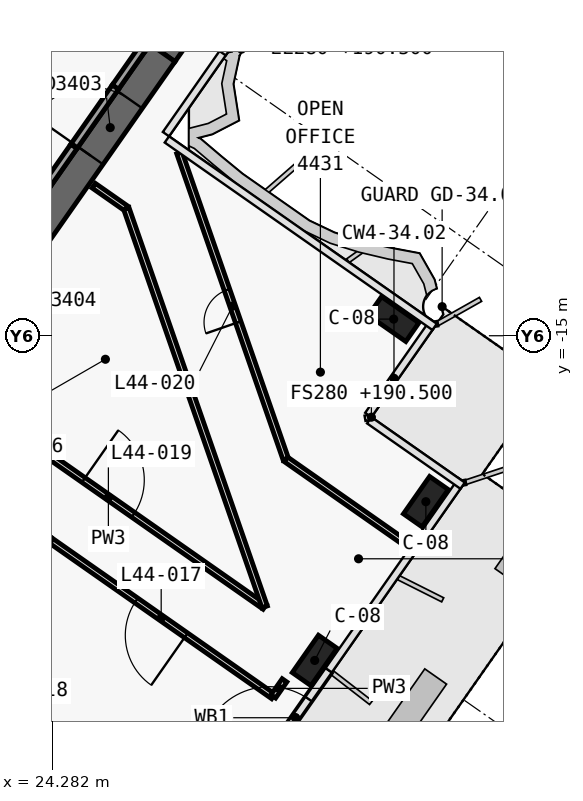
"""IFC4 building model, lengths in metres.
Left out: names, types, materials, properties, quantities, classifications, styles, units other than length and angle.
Written with IfcOpenShell. Run it as: python <this file> out.ifc"""

import sys

from ifc_helpers import new_model, si_unit, direction, frame, frame_2d, origin, origin_2d, place, context, subcontext, project, spatial, polyline, rectangle, outline, extrude, element, fill, save


model = new_model("IFC4")
c1 = context("Model", 3, precision=1e-05, world=origin(), true_north=direction((0.0, 1.0)))
c2 = subcontext(c1, "Body", "Model", "MODEL_VIEW")
j1 = project(units=[si_unit("LENGTHUNIT", "METRE"), si_unit("PLANEANGLEUNIT", "RADIAN")], contexts=[c1])
p1 = place(None, origin())
s1 = spatial("IfcSite", under=j1, at=p1, CompositionType="ELEMENT")
p2 = place(p1, origin())
s2 = spatial("IfcBuilding", under=s1, at=p2, CompositionType="ELEMENT")
p3 = place(p2, frame((0.0, 0.0, 190.5)))
s3 = spatial("IfcBuildingStorey", under=s2, at=p3, CompositionType="ELEMENT", Elevation=190.5)
p4 = place(p3, frame((-0.029, 11.984, 0.0), z_axis=(0.0, 0.0, 1.0), x_axis=(0.819151382952, -0.573577380837, 0.0)))
e1 = element("IfcWall", 1, at=p4, inside=s3, PredefinedType="SHEAR", context=c2, shape_type="SweptSolid", body=[
    extrude(outline(polyline([(33.898, 0.4), (-0.0, 0.4), (0.56, -0.4), (33.898, -0.4), (33.898, 0.4)])), origin(), (0.0, 0.0, 1.0), 3.9),
])
p5 = place(p3, frame((21.675, -15.421, 0.0), z_axis=(0.0, 0.0, 1.0), x_axis=(0.573581815061, 0.819148278049, 0.0)))
e2 = element("IfcWall", 2, at=p5, inside=s3, PredefinedType="SHEAR", context=c2, shape_type="SweptSolid", body=[
    extrude(outline(polyline([(9.6, 0.4), (0.0, 0.4), (0.0, -0.4), (9.6, -0.4), (9.6, 0.4)])), origin(), (0.0, 0.0, 1.0), 3.9),
])
p6 = place(p5, frame((6.3, 0.0, 0.0)))
e3 = element("IfcOpeningElement", 3, at=p6, cuts=e2, PredefinedType="OPENING", context=c2, shape_type="SweptSolid", body=[
    extrude(rectangle(XDim=1.8, YDim=2.1, at=frame_2d((0.9, 1.05))), frame((0.0, 0.41, 0.0), z_axis=(0.0, -1.0, 0.0), x_axis=(1.0, 0.0, 0.0)), (0.0, 0.0, 1.0), 0.82),
])
p7 = place(p5, frame((2.1, 0.0, 0.0)))
e4 = element("IfcOpeningElement", 4, at=p7, cuts=e2, PredefinedType="OPENING", context=c2, shape_type="SweptSolid", body=[
    extrude(rectangle(XDim=1.8, YDim=2.1, at=frame_2d((0.9, 1.05))), frame((0.0, 0.41, 0.0), z_axis=(0.0, -1.0, 0.0), x_axis=(1.0, 0.0, 0.0)), (0.0, 0.0, 1.0), 0.82),
])
for number, where, z_axis, x_axis in (
    (5, (33.263, -14.562, 0.0), (0.0, 0.0, 1.0), (0.819, -0.574, 0.0)),
    (6, (31.185, -23.545, 0.0), (0.0, 0.0, 1.0), (0.574, 0.819, 0.0)),
    (7, (34.11, -19.367, 0.0), (0.0, 0.0, 1.0), (0.574, 0.819, 0.0)),
):
    element("IfcColumn", number, at=place(p3, frame(where, z_axis=z_axis, x_axis=x_axis)), inside=s3, PredefinedType="COLUMN", context=c2, shape_type="SweptSolid", body=[
        extrude(rectangle(XDim=1.2, YDim=0.6, at=origin_2d()), origin(), (0.0, 0.0, 1.0), 3.9),
    ])
p8 = place(p3, frame((24.162, -10.998, 0.0), z_axis=(0.0, 0.0, 1.0), x_axis=(0.573612502218, 0.819126789514, 0.0)))
e8 = element("IfcWall", 8, at=p8, inside=s3, PredefinedType="SOLIDWALL", context=c2, shape_type="SweptSolid", body=[
    extrude(rectangle(XDim=1.2, YDim=0.2, at=frame_2d((0.6, 0.0))), origin(), (0.0, 0.0, 1.0), 3.62),
])
p9 = place(p3, frame((25.94, -8.458, 0.0), z_axis=(0.0, 0.0, 1.0), x_axis=(0.573619628835, 0.819121798889, 0.0)))
e9 = element("IfcWall", 9, at=p9, inside=s3, PredefinedType="SOLIDWALL", context=c2, shape_type="SweptSolid", body=[
    extrude(rectangle(XDim=1.25, YDim=0.2, at=frame_2d((0.625, 0.0))), origin(), (0.0, 0.0, 1.0), 3.62),
])
p10 = place(p3, frame((24.85, -10.014, 2.15), z_axis=(0.0, 0.0, 1.0), x_axis=(0.573505465124, 0.819201734296, 0.0)))
e10 = element("IfcWall", 10, at=p10, inside=s3, PredefinedType="SOLIDWALL", context=c2, shape_type="SweptSolid", body=[
    extrude(rectangle(XDim=1.9, YDim=0.2, at=frame_2d((0.95, 0.0))), origin(), (0.0, 0.0, 1.0), 1.47),
])
p11 = place(p3, frame((29.821, -26.277, 0.0), z_axis=(0.0, 0.0, 1.0), x_axis=(0.57360481557, 0.819132172213, 0.0)))
e11 = element("IfcWall", 11, at=p11, inside=s3, PredefinedType="SOLIDWALL", context=c2, shape_type="SweptSolid", body=[
    extrude(rectangle(XDim=2.99, YDim=0.2, at=frame_2d((1.495, 0.0))), origin(), (0.0, 0.0, 1.0), 3.62),
])
p12 = place(p11, frame((0.295, 0.0, 0.0)))
e12 = element("IfcOpeningElement", 12, at=p12, cuts=e11, PredefinedType="OPENING", context=c2, shape_type="SweptSolid", body=[
    extrude(rectangle(XDim=1.8, YDim=2.4, at=frame_2d((0.9, 1.2))), frame((0.0, 0.11, 0.0), z_axis=(0.0, -1.0, 0.0), x_axis=(1.0, 0.0, 0.0)), (0.0, 0.0, 1.0), 0.22),
])
p13 = place(p3, frame((21.642, -16.375, 0.0), z_axis=(0.0, 0.0, 1.0), x_axis=(0.819157697527, -0.573568362606, 0.0)))
e13 = element("IfcWall", 13, at=p13, inside=s3, PredefinedType="PARTITIONING", context=c2, shape_type="SweptSolid", body=[
    extrude(rectangle(XDim=10.045, YDim=0.15, at=frame_2d((5.023, 0.0))), origin(), (0.0, 0.0, 1.0), 3.0),
])
p14 = place(p13, frame((4.223, 0.0, 0.0)))
e14 = element("IfcOpeningElement", 14, at=p14, cuts=e13, PredefinedType="OPENING", context=c2, shape_type="SweptSolid", body=[
    extrude(rectangle(XDim=1.6, YDim=2.1, at=frame_2d((0.8, 1.05))), frame((0.0, 0.085, 0.0), z_axis=(0.0, -1.0, 0.0), x_axis=(1.0, 0.0, 0.0)), (0.0, 0.0, 1.0), 0.17),
])
p15 = place(p3, frame((30.095, -24.491, 0.0), z_axis=(0.0, 0.0, 1.0), x_axis=(-0.819144322262, 0.57358746439, 0.0)))
e15 = element("IfcWall", 15, at=p15, inside=s3, PredefinedType="PARTITIONING", context=c2, shape_type="SweptSolid", body=[
    extrude(rectangle(XDim=7.202, YDim=0.15, at=frame_2d((3.601, 0.0))), origin(), (0.0, 0.0, 1.0), 3.0),
])
p16 = place(p15, frame((2.801, 0.0, 0.0)))
e16 = element("IfcOpeningElement", 16, at=p16, cuts=e15, PredefinedType="OPENING", context=c2, shape_type="SweptSolid", body=[
    extrude(rectangle(XDim=1.6, YDim=2.1, at=frame_2d((0.8, 1.05))), frame((0.0, 0.085, 0.0), z_axis=(0.0, -1.0, 0.0), x_axis=(1.0, 0.0, 0.0)), (0.0, 0.0, 1.0), 0.17),
])
p17 = place(p3, frame((30.391, -24.069, 0.0), z_axis=(0.0, 0.0, 1.0), x_axis=(-0.573462344363, -0.819231920519, 0.0)))
e17 = element("IfcWall", 17, at=p17, inside=s3, PredefinedType="PARTITIONING", context=c2, shape_type="SweptSolid", body=[
    extrude(rectangle(XDim=0.516, YDim=0.15, at=frame_2d((0.258, 0.0))), origin(), (0.0, 0.0, 1.0), 3.62),
])
p18 = place(p3, frame((30.425, -18.251, 0.0), z_axis=(0.0, 0.0, 1.0), x_axis=(-0.328044658963, 0.944662215676, 0.0)))
e18 = element("IfcWall", 18, at=p18, inside=s3, PredefinedType="PARTITIONING", context=c2, shape_type="SweptSolid", body=[
    extrude(rectangle(XDim=8.536, YDim=0.15, at=frame_2d((4.268, 0.0))), origin(), (0.0, 0.0, 1.0), 3.0),
])
p19 = place(p18, frame((3.818, 0.0, 0.0)))
e19 = element("IfcOpeningElement", 19, at=p19, cuts=e18, PredefinedType="OPENING", context=c2, shape_type="SweptSolid", body=[
    extrude(rectangle(XDim=0.9, YDim=2.1, at=frame_2d((0.45, 1.05))), frame((0.0, 0.085, 0.0), z_axis=(0.0, -1.0, 0.0), x_axis=(1.0, 0.0, 0.0)), (0.0, 0.0, 1.0), 0.17),
])
p20 = place(p3, frame((33.709, -20.55, 0.0), z_axis=(0.0, 0.0, 1.0), x_axis=(-0.819146074823, 0.573584961538, 0.0)))
e20 = element("IfcWall", 20, at=p20, inside=s3, PredefinedType="PARTITIONING", context=c2, shape_type="SweptSolid", body=[
    extrude(rectangle(XDim=4.009, YDim=0.15, at=frame_2d((2.004, 0.0))), origin(), (0.0, 0.0, 1.0), 2.9),
])
p21 = place(p3, frame((25.37, -11.051, 0.0), z_axis=(0.0, 0.0, 1.0), x_axis=(0.819396161963, -0.573227642181, 0.0)))
e21 = element("IfcWall", 21, at=p21, inside=s3, PredefinedType="PARTITIONING", context=c2, shape_type="SweptSolid", body=[
    extrude(rectangle(XDim=1.047, YDim=0.15, at=frame_2d((0.524, 0.0))), origin(), (0.0, 0.0, 1.0), 3.62),
])
p22 = place(p3, frame((26.228, -11.651, 0.0), z_axis=(0.0, 0.0, 1.0), x_axis=(0.328068399041, -0.944653971331, 0.0)))
e22 = element("IfcWall", 22, at=p22, inside=s3, PredefinedType="PARTITIONING", context=c2, shape_type="SweptSolid", body=[
    extrude(rectangle(XDim=11.099, YDim=0.15, at=frame_2d((5.549, 0.0))), origin(), (0.0, 0.0, 1.0), 3.0),
])
p23 = place(p3, frame((25.629, -26.859, 0.0), z_axis=(0.0, 0.0, 1.0), x_axis=(-0.819154669329, 0.573572687386, 0.0)))
e23 = element("IfcWall", 23, at=p23, inside=s3, PredefinedType="PARTITIONING", context=c2, shape_type="SweptSolid", body=[
    extrude(rectangle(XDim=4.9, YDim=0.1, at=frame_2d((2.45, 0.0))), origin(), (0.0, 0.0, 1.0), 3.0),
])
p24 = place(p23, frame((2.0, 0.0, 0.0)))
e24 = element("IfcOpeningElement", 24, at=p24, cuts=e23, PredefinedType="OPENING", context=c2, shape_type="SweptSolid", body=[
    extrude(rectangle(XDim=0.9, YDim=2.1, at=frame_2d((0.45, 1.05))), frame((0.0, 0.06, 0.0), z_axis=(0.0, -1.0, 0.0), x_axis=(1.0, 0.0, 0.0)), (0.0, 0.0, 1.0), 0.12),
])
p25 = place(p6, origin())
e25 = element("IfcDoor", 25, at=p25, inside=s3, OperationType="DOUBLE_DOOR_SINGLE_SWING", PredefinedType="DOOR", context=c2, shape_type="SweptSolid", body=[
    extrude(rectangle(XDim=1.8, YDim=2.1, at=frame_2d((0.9, 1.05))), frame((0.0, 0.025, 0.0), z_axis=(0.0, -1.0, 0.0), x_axis=(1.0, 0.0, 0.0)), (0.0, 0.0, 1.0), 0.05),
])
fill(e3, e25)
p26 = place(p12, origin())
e26 = element("IfcDoor", 26, at=p26, inside=s3, OperationType="DOUBLE_DOOR_DOUBLE_SWING", PredefinedType="DOOR", context=c2, shape_type="SweptSolid", body=[
    extrude(rectangle(XDim=1.8, YDim=2.4, at=frame_2d((0.9, 1.2))), frame((0.0, 0.025, 0.0), z_axis=(0.0, -1.0, 0.0), x_axis=(1.0, 0.0, 0.0)), (0.0, 0.0, 1.0), 0.05),
])
fill(e12, e26)
p27 = place(p16, origin())
e27 = element("IfcDoor", 27, at=p27, inside=s3, OperationType="DOUBLE_DOOR_SINGLE_SWING", PredefinedType="DOOR", context=c2, shape_type="SweptSolid", body=[
    extrude(rectangle(XDim=1.6, YDim=2.1, at=frame_2d((0.8, 1.05))), frame((0.0, 0.025, 0.0), z_axis=(0.0, -1.0, 0.0), x_axis=(1.0, 0.0, 0.0)), (0.0, 0.0, 1.0), 0.05),
])
fill(e16, e27)
p28 = place(p14, origin())
e28 = element("IfcDoor", 28, at=p28, inside=s3, OperationType="DOUBLE_DOOR_SINGLE_SWING", PredefinedType="DOOR", context=c2, shape_type="SweptSolid", body=[
    extrude(rectangle(XDim=1.6, YDim=2.1, at=frame_2d((0.8, 1.05))), frame((0.0, 0.025, 0.0), z_axis=(0.0, -1.0, 0.0), x_axis=(1.0, 0.0, 0.0)), (0.0, 0.0, 1.0), 0.05),
])
fill(e14, e28)
p29 = place(p19, origin())
e29 = element("IfcDoor", 29, at=p29, inside=s3, OperationType="SINGLE_SWING_LEFT", PredefinedType="DOOR", context=c2, shape_type="SweptSolid", body=[
    extrude(rectangle(XDim=0.9, YDim=2.1, at=frame_2d((0.45, 1.05))), frame((0.0, 0.025, 0.0), z_axis=(0.0, -1.0, 0.0), x_axis=(1.0, 0.0, 0.0)), (0.0, 0.0, 1.0), 0.05),
])
fill(e19, e29)
save(model, sys.argv[1])
